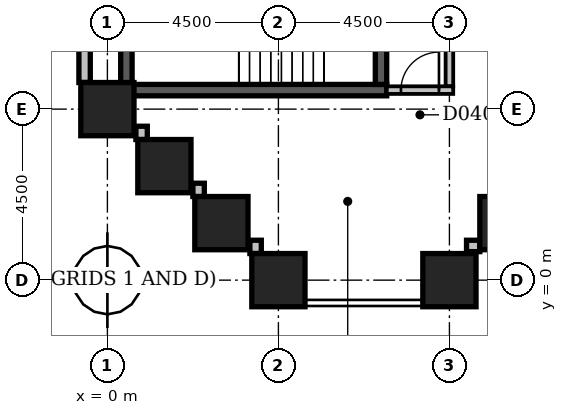
"""IFC4 building model, lengths in metres.
Left out: names, types, materials, properties, quantities, classifications, styles, units other than length and angle.
Written with IfcOpenShell. Run it as: python <this file> out.ifc"""

import sys

from ifc_helpers import new_model, si_unit, direction, frame, frame_2d, origin, origin_2d, place, context, subcontext, project, spatial, rectangle, extrude, element, fill, save


model = new_model("IFC4")
c1 = context("Model", 3, precision=1e-05, world=origin(), true_north=direction((0.0, 1.0)))
c2 = subcontext(c1, "Body", "Model", "MODEL_VIEW")
j1 = project(units=[si_unit("LENGTHUNIT", "METRE"), si_unit("PLANEANGLEUNIT", "RADIAN")], contexts=[c1])
p1 = place(None, origin())
s1 = spatial("IfcSite", under=j1, at=p1, CompositionType="ELEMENT")
p2 = place(p1, origin())
s2 = spatial("IfcBuilding", under=s1, at=p2, CompositionType="ELEMENT")
p3 = place(p2, frame((0.0, 0.0, 24.0)))
s3 = spatial("IfcBuildingStorey", under=s2, at=p3, CompositionType="ELEMENT", Elevation=24.0)
p4 = place(p3, frame((0.35, 5.0, -0.45), z_axis=(0.0, 0.0, 1.0), x_axis=(1.0, 0.0, 0.0)))
e1 = element("IfcWall", 1, at=p4, inside=s3, PredefinedType="SHEAR", context=c2, shape_type="SweptSolid", body=[
    extrude(rectangle(XDim=7.0, YDim=0.3, at=frame_2d((3.5, 0.0))), origin(), (0.0, 0.0, 1.0), 5.15),
])
p5 = place(p3, frame((0.5, 5.15, -0.45), z_axis=(0.0, 0.0, 1.0), x_axis=(0.0, 1.0, 0.0)))
e2 = element("IfcWall", 2, at=p5, inside=s3, PredefinedType="SHEAR", context=c2, shape_type="SweptSolid", body=[
    extrude(rectangle(XDim=4.2, YDim=0.3, at=frame_2d((2.1, 0.0))), origin(), (0.0, 0.0, 1.0), 5.15),
])
p6 = place(p3, frame((7.2, 5.15, -0.45), z_axis=(0.0, 0.0, 1.0), x_axis=(0.0, 1.0, 0.0)))
e3 = element("IfcWall", 3, at=p6, inside=s3, PredefinedType="SHEAR", context=c2, shape_type="SweptSolid", body=[
    extrude(rectangle(XDim=4.2, YDim=0.3, at=frame_2d((2.1, 0.0))), origin(), (0.0, 0.0, 1.0), 5.15),
])
p7 = place(p6, frame((1.55, 0.0, 0.45)))
e4 = element("IfcOpeningElement", 4, at=p7, cuts=e3, PredefinedType="OPENING", context=c2, shape_type="SweptSolid", body=[
    extrude(rectangle(XDim=1.1, YDim=2.1, at=frame_2d((0.55, 1.05))), frame((0.0, 0.162, 0.0), z_axis=(0.0, -1.0, 0.0), x_axis=(1.0, 0.0, 0.0)), (0.0, 0.0, 1.0), 0.324),
])
for number, where, z_axis, x_axis in (
    (5, (4.5, 0.0, -0.45), (0.0, 0.0, 1.0), (1.0, 0.0, 0.0)),
    (6, (9.0, 0.0, -0.45), (0.0, 0.0, 1.0), (1.0, 0.0, 0.0)),
    (7, (3.0, 1.5, -0.45), (0.0, 0.0, 1.0), (1.0, 0.0, 0.0)),
    (8, (10.5, 1.5, -0.45), (0.0, 0.0, 1.0), (1.0, 0.0, 0.0)),
    (9, (1.5, 3.0, -0.45), (0.0, 0.0, 1.0), (1.0, 0.0, 0.0)),
    (10, (0.0, 4.5, -0.45), (0.0, 0.0, 1.0), (1.0, 0.0, 0.0)),
):
    element("IfcColumn", number, at=place(p3, frame(where, z_axis=z_axis, x_axis=x_axis)), inside=s3, PredefinedType="COLUMN", context=c2, shape_type="SweptSolid", body=[
        extrude(rectangle(XDim=1.4, YDim=1.4, at=origin_2d()), origin(), (0.0, 0.0, 1.0), 5.15),
    ])
p8 = place(p3, frame((9.45, 0.9, 0.0), z_axis=(0.0, 0.0, 1.0), x_axis=(1.0, 0.0, 0.0)))
e11 = element("IfcWall", 11, at=p8, inside=s3, PredefinedType="STANDARD", context=c2, shape_type="SweptSolid", body=[
    extrude(rectangle(XDim=0.35, YDim=0.3, at=frame_2d((0.175, 0.0))), origin(), (0.0, 0.0, 1.0), 4.1),
])
p9 = place(p3, frame((-0.6, 8.3, 0.0), z_axis=(0.0, 0.0, 1.0), x_axis=(0.0, -1.0, 0.0)))
e12 = element("IfcWall", 12, at=p9, inside=s3, PredefinedType="STANDARD", context=c2, shape_type="SweptSolid", body=[
    extrude(rectangle(XDim=3.1, YDim=0.3, at=frame_2d((1.55, 0.0))), origin(), (0.0, 0.0, 1.0), 4.1),
])
for number, where, z_axis, x_axis in (
    (13, (0.9, 4.05, 0.0), (0.0, 0.0, 1.0), (0.0, -1.0, 0.0)),
    (14, (2.4, 2.55, 0.0), (0.0, 0.0, 1.0), (0.0, -1.0, 0.0)),
    (15, (3.9, 1.05, 0.0), (0.0, 0.0, 1.0), (0.0, -1.0, 0.0)),
):
    element("IfcWall", number, at=place(p3, frame(where, z_axis=z_axis, x_axis=x_axis)), inside=s3, PredefinedType="STANDARD", context=c2, shape_type="SweptSolid", body=[
        extrude(rectangle(XDim=0.35, YDim=0.3, at=frame_2d((0.175, 0.0))), origin(), (0.0, 0.0, 1.0), 4.1),
    ])
p10 = place(p3, frame((7.35, 5.0, 0.0), z_axis=(0.0, 0.0, 1.0), x_axis=(1.0, 0.0, 0.0)))
e16 = element("IfcWall", 16, at=p10, inside=s3, PredefinedType="PARTITIONING", context=c2, shape_type="SweptSolid", body=[
    extrude(rectangle(XDim=1.75, YDim=0.2, at=frame_2d((0.875, 0.0))), origin(), (0.0, 0.0, 1.0), 4.7),
])
p11 = place(p10, frame((0.375, 0.0, 0.0)))
e17 = element("IfcOpeningElement", 17, at=p11, cuts=e16, PredefinedType="OPENING", context=c2, shape_type="SweptSolid", body=[
    extrude(rectangle(XDim=1.0, YDim=2.1, at=frame_2d((0.5, 1.05))), frame((0.0, 0.112, 0.0), z_axis=(0.0, -1.0, 0.0), x_axis=(1.0, 0.0, 0.0)), (0.0, 0.0, 1.0), 0.224),
])
p12 = place(p3, frame((9.0, 5.1, 0.0), z_axis=(0.0, 0.0, 1.0), x_axis=(0.0, 1.0, 0.0)))
e18 = element("IfcWall", 18, at=p12, inside=s3, PredefinedType="PARTITIONING", context=c2, shape_type="SweptSolid", body=[
    extrude(rectangle(XDim=8.9, YDim=0.2, at=frame_2d((4.45, 0.0))), origin(), (0.0, 0.0, 1.0), 4.7),
])
p13 = place(p12, frame((3.575, 0.0, 0.0)))
e19 = element("IfcOpeningElement", 19, at=p13, cuts=e18, PredefinedType="OPENING", context=c2, shape_type="SweptSolid", body=[
    extrude(rectangle(XDim=1.8, YDim=2.4, at=frame_2d((0.9, 1.2))), frame((0.0, 0.112, 0.0), z_axis=(0.0, -1.0, 0.0), x_axis=(1.0, 0.0, 0.0)), (0.0, 0.0, 1.0), 0.224),
])
p14 = place(p11, frame((1.0, 0.0, 0.0), z_axis=(0.0, 0.0, 1.0), x_axis=(-1.0, 0.0, 0.0)))
e20 = element("IfcDoor", 20, at=p14, inside=s3, OperationType="SINGLE_SWING_LEFT", PredefinedType="DOOR", context=c2, shape_type="SweptSolid", body=[
    extrude(rectangle(XDim=1.0, YDim=2.1, at=frame_2d((0.5, 1.05))), frame((0.0, 0.025, 0.0), z_axis=(0.0, -1.0, 0.0), x_axis=(1.0, 0.0, 0.0)), (0.0, 0.0, 1.0), 0.05),
])
fill(e17, e20)
save(model, sys.argv[1])
